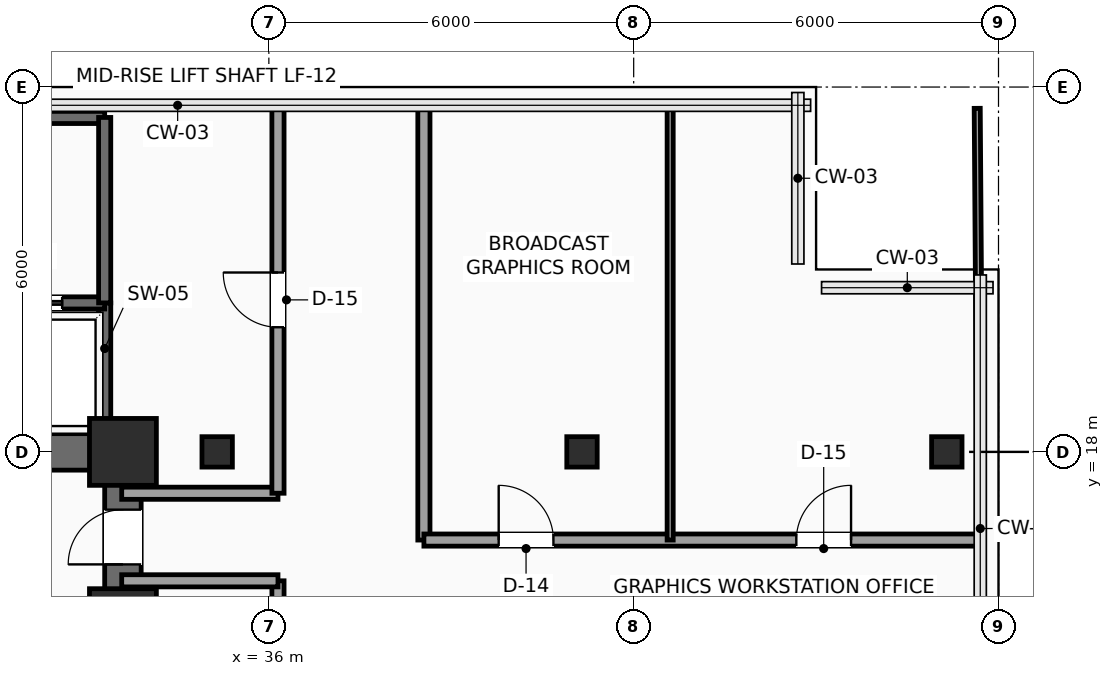
"""IFC4 building model, lengths in metres.
Left out: names, types, materials, properties, quantities, classifications, styles, units other than length and angle.
Written with IfcOpenShell. Run it as: python <this file> out.ifc"""

import sys

from ifc_helpers import new_model, si_unit, direction, frame, frame_2d, origin, origin_2d, place, context, subcontext, project, spatial, rectangle, hollow_rectangle, extrude, element, fill, save


model = new_model("IFC4")
c1 = context("Model", 3, precision=1e-05, world=origin(), true_north=direction((0.0, 1.0)))
c2 = subcontext(c1, "Body", "Model", "MODEL_VIEW")
j1 = project(units=[si_unit("LENGTHUNIT", "METRE"), si_unit("PLANEANGLEUNIT", "RADIAN")], contexts=[c1])
p1 = place(None, origin())
s1 = spatial("IfcSite", under=j1, at=p1, CompositionType="ELEMENT")
p2 = place(p1, origin())
s2 = spatial("IfcBuilding", under=s1, at=p2, CompositionType="ELEMENT")
p3 = place(p2, frame((0.0, 0.0, 141.9)))
s3 = spatial("IfcBuildingStorey", under=s2, at=p3, CompositionType="ELEMENT", Elevation=141.9)
for number, where, z_axis, x_axis in (
    (1, (33.6, 15.2, 0.0), (0.0, 0.0, 1.0), (1.0, 0.0, 0.0)),
    (2, (33.6, 18.0, 0.0), (0.0, 0.0, 1.0), (1.0, 0.0, 0.0)),
):
    element("IfcColumn", number, at=place(p3, frame(where, z_axis=z_axis, x_axis=x_axis)), inside=s3, PredefinedType="COLUMN", context=c2, shape_type="SweptSolid", body=[
        extrude(rectangle(XDim=1.1, YDim=1.1, at=origin_2d()), origin(), (0.0, 0.0, 1.0), 3.75),
    ])
for number, where, z_axis, x_axis in (
    (3, (35.15, 18.0, 0.0), (0.0, 0.0, 1.0), (1.0, 0.0, 0.0)),
    (4, (41.15, 18.0, 0.0), (0.0, 0.0, 1.0), (1.0, 0.0, 0.0)),
    (5, (47.15, 18.0, 0.0), (0.0, 0.0, 1.0), (1.0, 0.0, 0.0)),
):
    element("IfcColumn", number, at=place(p3, frame(where, z_axis=z_axis, x_axis=x_axis)), inside=s3, PredefinedType="COLUMN", context=c2, shape_type="SweptSolid", body=[
        extrude(hollow_rectangle(XDim=0.5, YDim=0.5, WallThickness=0.025, InnerFilletRadius=0.025, OuterFilletRadius=0.04, at=origin_2d()), origin(), (0.0, 0.0, 1.0), 3.75),
    ])
p4 = place(p3, frame((24.0, 18.0, 0.0), z_axis=(0.0, 0.0, 1.0), x_axis=(1.0, 0.0, 0.0)))
e6 = element("IfcWall", 6, at=p4, inside=s3, PredefinedType="SHEAR", context=c2, shape_type="SweptSolid", body=[
    extrude(rectangle(XDim=9.6, YDim=0.6, at=frame_2d((4.8, 0.0))), origin(), (0.0, 0.0, 1.0), 3.525),
])
p5 = place(p3, frame((33.6, 6.0, 0.0), z_axis=(0.0, 0.0, 1.0), x_axis=(0.0, 1.0, 0.0)))
e7 = element("IfcWall", 7, at=p5, inside=s3, PredefinedType="SHEAR", context=c2, shape_type="SweptSolid", body=[
    extrude(rectangle(XDim=12.0, YDim=0.6, at=frame_2d((6.0, 0.0))), origin(), (0.0, 0.0, 1.0), 3.525),
])
p6 = place(p5, frame((10.15, 0.0, 0.0)))
e8 = element("IfcOpeningElement", 8, at=p6, cuts=e7, PredefinedType="OPENING", context=c2, shape_type="SweptSolid", body=[
    extrude(rectangle(XDim=0.9, YDim=2.15, at=frame_2d((0.45, 1.075))), frame((0.0, 0.31, 0.0), z_axis=(0.0, -1.0, 0.0), x_axis=(1.0, 0.0, 0.0)), (0.0, 0.0, 1.0), 0.62),
])
p7 = place(p3, frame((33.3, 18.1, 0.0), z_axis=(0.0, 0.0, 1.0), x_axis=(0.0, 1.0, 0.0)))
e9 = element("IfcWall", 9, at=p7, inside=s3, PredefinedType="SHEAR", context=c2, shape_type="SweptSolid", body=[
    extrude(rectangle(XDim=2.35, YDim=0.2, at=frame_2d((1.175, 0.0))), origin(), (0.0, 0.0, 1.0), 3.525),
])
p8 = place(p3, frame((24.25, 20.45, 0.0), z_axis=(0.0, 0.0, 1.0), x_axis=(1.0, 0.0, 0.0)))
e10 = element("IfcWall", 10, at=p8, inside=s3, PredefinedType="SHEAR", context=c2, shape_type="SweptSolid", body=[
    extrude(rectangle(XDim=9.05, YDim=0.2, at=frame_2d((4.525, 0.0))), origin(), (0.0, 0.0, 1.0), 3.525),
])
p9 = place(p8, frame((0.4, 0.0, 0.0)))
e11 = element("IfcOpeningElement", 11, at=p9, cuts=e10, PredefinedType="OPENING", context=c2, shape_type="SweptSolid", body=[
    extrude(rectangle(XDim=1.2, YDim=2.2, at=frame_2d((0.6, 1.1))), frame((0.0, 0.11, 0.0), z_axis=(0.0, -1.0, 0.0), x_axis=(1.0, 0.0, 0.0)), (0.0, 0.0, 1.0), 0.22),
])
p10 = place(p8, frame((2.65, 0.0, 0.0)))
e12 = element("IfcOpeningElement", 12, at=p10, cuts=e10, PredefinedType="OPENING", context=c2, shape_type="SweptSolid", body=[
    extrude(rectangle(XDim=1.2, YDim=2.2, at=frame_2d((0.6, 1.1))), frame((0.0, 0.11, 0.0), z_axis=(0.0, -1.0, 0.0), x_axis=(1.0, 0.0, 0.0)), (0.0, 0.0, 1.0), 0.22),
])
p11 = place(p8, frame((4.9, 0.0, 0.0)))
e13 = element("IfcOpeningElement", 13, at=p11, cuts=e10, PredefinedType="OPENING", context=c2, shape_type="SweptSolid", body=[
    extrude(rectangle(XDim=1.2, YDim=2.2, at=frame_2d((0.6, 1.1))), frame((0.0, 0.11, 0.0), z_axis=(0.0, -1.0, 0.0), x_axis=(1.0, 0.0, 0.0)), (0.0, 0.0, 1.0), 0.22),
])
p12 = place(p8, frame((7.15, 0.0, 0.0)))
e14 = element("IfcOpeningElement", 14, at=p12, cuts=e10, PredefinedType="OPENING", context=c2, shape_type="SweptSolid", body=[
    extrude(rectangle(XDim=1.2, YDim=2.2, at=frame_2d((0.6, 1.1))), frame((0.0, 0.11, 0.0), z_axis=(0.0, -1.0, 0.0), x_axis=(1.0, 0.0, 0.0)), (0.0, 0.0, 1.0), 0.22),
])
p13 = place(p3, frame((24.15, 23.5, 0.0), z_axis=(0.0, 0.0, 1.0), x_axis=(1.0, 0.0, 0.0)))
e15 = element("IfcWall", 15, at=p13, inside=s3, PredefinedType="SHEAR", context=c2, shape_type="SweptSolid", body=[
    extrude(rectangle(XDim=9.15, YDim=0.2, at=frame_2d((4.575, 0.0))), origin(), (0.0, 0.0, 1.0), 3.525),
])
p14 = place(p3, frame((33.3, 20.45, 0.0), z_axis=(0.0, 0.0, 1.0), x_axis=(0.0, 1.0, 0.0)))
e16 = element("IfcWall", 16, at=p14, inside=s3, PredefinedType="SHEAR", context=c2, shape_type="SweptSolid", body=[
    extrude(rectangle(XDim=3.05, YDim=0.2, at=frame_2d((1.525, 0.0))), origin(), (0.0, 0.0, 1.0), 3.525),
])
p15 = place(p3, frame((36.15, 5.8, 0.0), z_axis=(0.0, 0.0, 1.0), x_axis=(0.0, 1.0, 0.0)))
e17 = element("IfcWall", 17, at=p15, inside=s3, PredefinedType="PARTITIONING", context=c2, shape_type="SweptSolid", body=[
    extrude(rectangle(XDim=10.08, YDim=0.2, at=frame_2d((5.04, 0.0))), origin(), (0.0, 0.0, 1.0), 3.525),
])
p16 = place(p15, frame((2.05, 0.0, 0.0)))
e18 = element("IfcOpeningElement", 18, at=p16, cuts=e17, PredefinedType="OPENING", context=c2, shape_type="SweptSolid", body=[
    extrude(rectangle(XDim=0.9, YDim=2.1, at=frame_2d((0.45, 1.05))), frame((0.0, 0.11, 0.0), z_axis=(0.0, -1.0, 0.0), x_axis=(1.0, 0.0, 0.0)), (0.0, 0.0, 1.0), 0.22),
])
p17 = place(p15, frame((7.09, 0.0, 0.0)))
e19 = element("IfcOpeningElement", 19, at=p17, cuts=e17, PredefinedType="OPENING", context=c2, shape_type="SweptSolid", body=[
    extrude(rectangle(XDim=0.9, YDim=2.1, at=frame_2d((0.45, 1.05))), frame((0.0, 0.11, 0.0), z_axis=(0.0, -1.0, 0.0), x_axis=(1.0, 0.0, 0.0)), (0.0, 0.0, 1.0), 0.22),
])
for number, where, z_axis, x_axis in (
    (20, (36.15, 15.88, 0.0), (0.0, 0.0, 1.0), (-1.0, 0.0, 0.0)),
    (21, (33.58, 17.32, 0.0), (0.0, 0.0, 1.0), (1.0, 0.0, 0.0)),
):
    element("IfcWall", number, at=place(p3, frame(where, z_axis=z_axis, x_axis=x_axis)), inside=s3, PredefinedType="PARTITIONING", context=c2, shape_type="SweptSolid", body=[
        extrude(rectangle(XDim=2.57, YDim=0.2, at=frame_2d((1.285, 0.0))), origin(), (0.0, 0.0, 1.0), 3.525),
    ])
p18 = place(p3, frame((36.15, 17.32, 0.0), z_axis=(0.0, 0.0, 1.0), x_axis=(0.0, 1.0, 0.0)))
e22 = element("IfcWall", 22, at=p18, inside=s3, PredefinedType="PARTITIONING", context=c2, shape_type="SweptSolid", body=[
    extrude(rectangle(XDim=6.38, YDim=0.2, at=frame_2d((3.19, 0.0))), origin(), (0.0, 0.0, 1.0), 3.525),
])
p19 = place(p18, frame((2.73, 0.0, 0.0)))
e23 = element("IfcOpeningElement", 23, at=p19, cuts=e22, PredefinedType="OPENING", context=c2, shape_type="SweptSolid", body=[
    extrude(rectangle(XDim=0.9, YDim=2.1, at=frame_2d((0.45, 1.05))), frame((0.0, 0.11, 0.0), z_axis=(0.0, -1.0, 0.0), x_axis=(1.0, 0.0, 0.0)), (0.0, 0.0, 1.0), 0.22),
])
p20 = place(p3, frame((38.55, 23.7, 0.0), z_axis=(0.0, 0.0, 1.0), x_axis=(0.0, -1.0, 0.0)))
e24 = element("IfcWall", 24, at=p20, inside=s3, PredefinedType="PARTITIONING", context=c2, shape_type="SweptSolid", body=[
    extrude(rectangle(XDim=7.15, YDim=0.2, at=frame_2d((3.575, 0.0))), origin(), (0.0, 0.0, 1.0), 3.525),
])
p21 = place(p3, frame((38.55, 16.55, 0.0), z_axis=(0.0, 0.0, 1.0), x_axis=(1.0, 0.0, 0.0)))
e25 = element("IfcWall", 25, at=p21, inside=s3, PredefinedType="PARTITIONING", context=c2, shape_type="SweptSolid", body=[
    extrude(rectangle(XDim=9.15, YDim=0.2, at=frame_2d((4.575, 0.0))), origin(), (0.0, 0.0, 1.0), 3.525),
])
p22 = place(p21, frame((1.23, 0.0, 0.0)))
e26 = element("IfcOpeningElement", 26, at=p22, cuts=e25, PredefinedType="OPENING", context=c2, shape_type="SweptSolid", body=[
    extrude(rectangle(XDim=0.9, YDim=2.1, at=frame_2d((0.45, 1.05))), frame((0.0, 0.11, 0.0), z_axis=(0.0, -1.0, 0.0), x_axis=(1.0, 0.0, 0.0)), (0.0, 0.0, 1.0), 0.22),
])
p23 = place(p21, frame((6.125, 0.0, 0.0)))
e27 = element("IfcOpeningElement", 27, at=p23, cuts=e25, PredefinedType="OPENING", context=c2, shape_type="SweptSolid", body=[
    extrude(rectangle(XDim=0.9, YDim=2.1, at=frame_2d((0.45, 1.05))), frame((0.0, 0.11, 0.0), z_axis=(0.0, -1.0, 0.0), x_axis=(1.0, 0.0, 0.0)), (0.0, 0.0, 1.0), 0.22),
])
p24 = place(p3, frame((42.6, 16.55, 0.0), z_axis=(0.0, 0.0, 1.0), x_axis=(0.0, 1.0, 0.0)))
e28 = element("IfcWall", 28, at=p24, inside=s3, PredefinedType="PARTITIONING", context=c2, shape_type="SweptSolid", body=[
    extrude(rectangle(XDim=7.15, YDim=0.1, at=frame_2d((3.575, 0.0))), origin(), (0.0, 0.0, 1.0), 3.525),
])
p25 = place(p3, frame((47.7, 16.55, 0.0), z_axis=(0.0, 0.0, 1.0), x_axis=(-0.007049101019, 0.999975154779, 0.0)))
e29 = element("IfcWall", 29, at=p25, inside=s3, PredefinedType="PARTITIONING", context=c2, shape_type="SweptSolid", body=[
    extrude(rectangle(XDim=7.1, YDim=0.1, at=frame_2d((3.55, 0.0))), origin(), (0.0, 0.0, 1.0), 3.525),
])
p26 = place(p6, origin())
e30 = element("IfcDoor", 30, at=p26, inside=s3, OperationType="SINGLE_SWING_LEFT", PredefinedType="DOOR", context=c2, shape_type="SweptSolid", body=[
    extrude(rectangle(XDim=0.9, YDim=2.15, at=frame_2d((0.45, 1.075))), frame((0.0, 0.025, 0.0), z_axis=(0.0, -1.0, 0.0), x_axis=(1.0, 0.0, 0.0)), (0.0, 0.0, 1.0), 0.05),
])
fill(e8, e30)
p27 = place(p12, origin())
e31 = element("IfcDoor", 31, at=p27, inside=s3, OperationType="SLIDING_TO_RIGHT", PredefinedType="DOOR", context=c2, shape_type="SweptSolid", body=[
    extrude(rectangle(XDim=1.2, YDim=2.2, at=frame_2d((0.6, 1.1))), frame((0.0, 0.025, 0.0), z_axis=(0.0, -1.0, 0.0), x_axis=(1.0, 0.0, 0.0)), (0.0, 0.0, 1.0), 0.05),
])
fill(e14, e31)
p28 = place(p19, origin())
e32 = element("IfcDoor", 32, at=p28, inside=s3, OperationType="SINGLE_SWING_RIGHT", PredefinedType="DOOR", context=c2, shape_type="SweptSolid", body=[
    extrude(rectangle(XDim=0.9, YDim=2.1, at=frame_2d((0.45, 1.05))), frame((0.0, 0.025, 0.0), z_axis=(0.0, -1.0, 0.0), x_axis=(1.0, 0.0, 0.0)), (0.0, 0.0, 1.0), 0.05),
])
fill(e23, e32)
p29 = place(p22, origin())
e33 = element("IfcDoor", 33, at=p29, inside=s3, OperationType="SINGLE_SWING_LEFT", PredefinedType="DOOR", context=c2, shape_type="SweptSolid", body=[
    extrude(rectangle(XDim=0.9, YDim=2.1, at=frame_2d((0.45, 1.05))), frame((0.0, 0.025, 0.0), z_axis=(0.0, -1.0, 0.0), x_axis=(1.0, 0.0, 0.0)), (0.0, 0.0, 1.0), 0.05),
])
fill(e26, e33)
p30 = place(p23, origin())
e34 = element("IfcDoor", 34, at=p30, inside=s3, OperationType="SINGLE_SWING_RIGHT", PredefinedType="DOOR", context=c2, shape_type="SweptSolid", body=[
    extrude(rectangle(XDim=0.9, YDim=2.1, at=frame_2d((0.45, 1.05))), frame((0.0, 0.025, 0.0), z_axis=(0.0, -1.0, 0.0), x_axis=(1.0, 0.0, 0.0)), (0.0, 0.0, 1.0), 0.05),
])
fill(e27, e34)
save(model, sys.argv[1])
